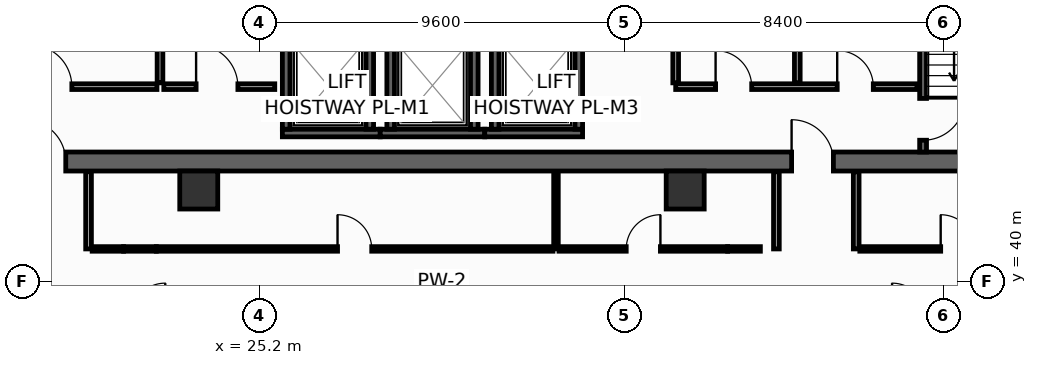
"""IFC4 building model, lengths in metres.
Left out: names, types, materials, properties, quantities, classifications, styles, units other than length and angle.
Written with IfcOpenShell. Run it as: python <this file> out.ifc"""

import sys

from ifc_helpers import new_model, si_unit, direction, frame, frame_2d, origin, origin_2d, place, context, subcontext, project, spatial, rectangle, hollow_rectangle, extrude, element, fill, save


model = new_model("IFC4")
c1 = context("Model", 3, precision=1e-05, world=origin(), true_north=direction((0.0, 1.0)))
c2 = subcontext(c1, "Body", "Model", "MODEL_VIEW")
j1 = project(units=[si_unit("LENGTHUNIT", "METRE"), si_unit("PLANEANGLEUNIT", "RADIAN")], contexts=[c1])
p1 = place(None, origin())
s1 = spatial("IfcSite", under=j1, at=p1, CompositionType="ELEMENT")
p2 = place(p1, origin())
s2 = spatial("IfcBuilding", under=s1, at=p2, CompositionType="ELEMENT")
p3 = place(p2, frame((0.0, 0.0, 163.8)))
s3 = spatial("IfcBuildingStorey", under=s2, at=p3, CompositionType="ELEMENT", Elevation=163.8)
p4 = place(p3, frame((13.6, 43.15, 0.0), z_axis=(0.0, 0.0, 1.0), x_axis=(1.0, 0.0, 0.0)))
e1 = element("IfcWall", 1, at=p4, inside=s3, PredefinedType="SHEAR", context=c2, shape_type="SweptSolid", body=[
    extrude(rectangle(XDim=32.7, YDim=0.5, at=frame_2d((16.35, 0.0))), origin(), (0.0, 0.0, 1.0), 3.55),
])
p5 = place(p4, frame((5.4, 0.0, 0.0)))
e2 = element("IfcOpeningElement", 2, at=p5, cuts=e1, PredefinedType="OPENING", context=c2, shape_type="SweptSolid", body=[
    extrude(rectangle(XDim=1.1, YDim=2.15, at=frame_2d((0.55, 1.075))), frame((0.0, 0.26, 0.0), z_axis=(0.0, -1.0, 0.0), x_axis=(1.0, 0.0, 0.0)), (0.0, 0.0, 1.0), 0.52),
])
p6 = place(p4, frame((25.6, 0.0, 0.0)))
e3 = element("IfcOpeningElement", 3, at=p6, cuts=e1, PredefinedType="OPENING", context=c2, shape_type="SweptSolid", body=[
    extrude(rectangle(XDim=1.1, YDim=2.15, at=frame_2d((0.55, 1.075))), frame((0.0, 0.26, 0.0), z_axis=(0.0, -1.0, 0.0), x_axis=(1.0, 0.0, 0.0)), (0.0, 0.0, 1.0), 0.52),
])
for number, where, z_axis, x_axis in (
    (4, (23.6, 42.4, 0.0), (0.0, 0.0, 1.0), (1.0, 0.0, 0.0)),
    (5, (36.4, 42.4, 0.0), (0.0, 0.0, 1.0), (1.0, 0.0, 0.0)),
):
    element("IfcColumn", number, at=place(p3, frame(where, z_axis=z_axis, x_axis=x_axis)), inside=s3, PredefinedType="COLUMN", context=c2, shape_type="SweptSolid", body=[
        extrude(hollow_rectangle(XDim=1.0, YDim=1.0, WallThickness=0.045, at=origin_2d()), origin(), (0.0, 0.0, 1.0), 3.8),
    ])
p7 = place(p3, frame((25.8, 43.9, 0.0), z_axis=(0.0, 0.0, 1.0), x_axis=(1.0, 0.0, 0.0)))
e6 = element("IfcWall", 6, at=p7, inside=s3, PredefinedType="SHEAR", context=c2, shape_type="SweptSolid", body=[
    extrude(rectangle(XDim=2.575, YDim=0.2, at=frame_2d((1.288, 0.0))), origin(), (0.0, 0.0, 1.0), 3.55),
])
for number, where, z_axis, x_axis in (
    (7, (25.9, 44.0, 0.0), (0.0, 0.0, 1.0), (0.0, 1.0, 0.0)),
    (8, (28.1, 44.0, 0.0), (0.0, 0.0, 1.0), (0.0, 1.0, 0.0)),
):
    element("IfcWall", number, at=place(p3, frame(where, z_axis=z_axis, x_axis=x_axis)), inside=s3, PredefinedType="SHEAR", context=c2, shape_type="SweptSolid", body=[
        extrude(rectangle(XDim=2.3, YDim=0.2, at=frame_2d((1.15, 0.0))), origin(), (0.0, 0.0, 1.0), 3.55),
    ])
p8 = place(p3, frame((28.375, 43.9, 0.0), z_axis=(0.0, 0.0, 1.0), x_axis=(1.0, 0.0, 0.0)))
e9 = element("IfcWall", 9, at=p8, inside=s3, PredefinedType="SHEAR", context=c2, shape_type="SweptSolid", body=[
    extrude(rectangle(XDim=2.75, YDim=0.2, at=frame_2d((1.375, 0.0))), origin(), (0.0, 0.0, 1.0), 3.55),
])
for number, where, z_axis, x_axis in (
    (10, (28.65, 44.0, 0.0), (0.0, 0.0, 1.0), (0.0, 1.0, 0.0)),
    (11, (30.85, 44.0, 0.0), (0.0, 0.0, 1.0), (0.0, 1.0, 0.0)),
):
    element("IfcWall", number, at=place(p3, frame(where, z_axis=z_axis, x_axis=x_axis)), inside=s3, PredefinedType="SHEAR", context=c2, shape_type="SweptSolid", body=[
        extrude(rectangle(XDim=2.3, YDim=0.2, at=frame_2d((1.15, 0.0))), origin(), (0.0, 0.0, 1.0), 3.55),
    ])
p9 = place(p3, frame((31.125, 43.9, 0.0), z_axis=(0.0, 0.0, 1.0), x_axis=(1.0, 0.0, 0.0)))
e12 = element("IfcWall", 12, at=p9, inside=s3, PredefinedType="SHEAR", context=c2, shape_type="SweptSolid", body=[
    extrude(rectangle(XDim=2.575, YDim=0.2, at=frame_2d((1.288, 0.0))), origin(), (0.0, 0.0, 1.0), 3.55),
])
for number, where, z_axis, x_axis in (
    (13, (31.4, 44.0, 0.0), (0.0, 0.0, 1.0), (0.0, 1.0, 0.0)),
    (14, (33.6, 44.0, 0.0), (0.0, 0.0, 1.0), (0.0, 1.0, 0.0)),
):
    element("IfcWall", number, at=place(p3, frame(where, z_axis=z_axis, x_axis=x_axis)), inside=s3, PredefinedType="SHEAR", context=c2, shape_type="SweptSolid", body=[
        extrude(rectangle(XDim=2.3, YDim=0.2, at=frame_2d((1.15, 0.0))), origin(), (0.0, 0.0, 1.0), 3.55),
    ])
p10 = place(p3, frame((42.66, 53.8, 0.0), z_axis=(0.0, 0.0, 1.0), x_axis=(0.0, -1.0, 0.0)))
e15 = element("IfcWall", 15, at=p10, inside=s3, PredefinedType="SHEAR", context=c2, shape_type="SweptSolid", body=[
    extrude(rectangle(XDim=10.4, YDim=0.18, at=frame_2d((5.2, 0.0))), origin(), (0.0, 0.0, 1.0), 3.55),
])
p11 = place(p10, frame((8.99, 0.0, 0.0)))
e16 = element("IfcOpeningElement", 16, at=p11, cuts=e15, PredefinedType="OPENING", context=c2, shape_type="SweptSolid", body=[
    extrude(rectangle(XDim=1.1, YDim=2.15, at=frame_2d((0.55, 1.075))), frame((0.0, 0.1, 0.0), z_axis=(0.0, -1.0, 0.0), x_axis=(1.0, 0.0, 0.0)), (0.0, 0.0, 1.0), 0.2),
])
p12 = place(p3, frame((17.36, 45.12, 0.0), z_axis=(0.0, 0.0, 1.0), x_axis=(1.0, 0.0, 0.0)))
e17 = element("IfcWall", 17, at=p12, inside=s3, PredefinedType="PARTITIONING", context=c2, shape_type="SweptSolid", body=[
    extrude(rectangle(XDim=5.14, YDim=0.15, at=frame_2d((2.57, 0.0))), origin(), (0.0, 0.0, 1.0), 3.55),
])
p13 = place(p12, frame((1.8, 0.0, 0.0)))
e18 = element("IfcOpeningElement", 18, at=p13, cuts=e17, PredefinedType="OPENING", context=c2, shape_type="SweptSolid", body=[
    extrude(rectangle(XDim=1.1, YDim=2.15, at=frame_2d((0.55, 1.075))), frame((0.0, 0.085, 0.0), z_axis=(0.0, -1.0, 0.0), x_axis=(1.0, 0.0, 0.0)), (0.0, 0.0, 1.0), 0.17),
])
p14 = place(p3, frame((22.58, 50.55, 0.0), z_axis=(0.0, 0.0, 1.0), x_axis=(0.0, -1.0, 0.0)))
e19 = element("IfcWall", 19, at=p14, inside=s3, PredefinedType="PARTITIONING", context=c2, shape_type="SweptSolid", body=[
    extrude(rectangle(XDim=5.33, YDim=0.15, at=frame_2d((2.665, 0.0))), origin(), (0.0, 0.0, 1.0), 3.55),
])
p15 = place(p14, frame((1.8, 0.0, 0.0)))
e20 = element("IfcOpeningElement", 20, at=p15, cuts=e19, PredefinedType="OPENING", context=c2, shape_type="SweptSolid", body=[
    extrude(rectangle(XDim=1.1, YDim=2.15, at=frame_2d((0.55, 1.075))), frame((0.0, 0.085, 0.0), z_axis=(0.0, -1.0, 0.0), x_axis=(1.0, 0.0, 0.0)), (0.0, 0.0, 1.0), 0.17),
])
p16 = place(p3, frame((22.68, 45.12, 0.0), z_axis=(0.0, 0.0, 1.0), x_axis=(1.0, 0.0, 0.0)))
e21 = element("IfcWall", 21, at=p16, inside=s3, PredefinedType="PARTITIONING", context=c2, shape_type="SweptSolid", body=[
    extrude(rectangle(XDim=2.92, YDim=0.15, at=frame_2d((1.46, 0.0))), origin(), (0.0, 0.0, 1.0), 3.55),
])
p17 = place(p16, frame((0.85, 0.0, 0.0)))
e22 = element("IfcOpeningElement", 22, at=p17, cuts=e21, PredefinedType="OPENING", context=c2, shape_type="SweptSolid", body=[
    extrude(rectangle(XDim=1.1, YDim=2.15, at=frame_2d((0.55, 1.075))), frame((0.0, 0.085, 0.0), z_axis=(0.0, -1.0, 0.0), x_axis=(1.0, 0.0, 0.0)), (0.0, 0.0, 1.0), 0.17),
])
p18 = place(p3, frame((36.15, 45.12, 0.0), z_axis=(0.0, 0.0, 1.0), x_axis=(1.0, 0.0, 0.0)))
e23 = element("IfcWall", 23, at=p18, inside=s3, PredefinedType="PARTITIONING", context=c2, shape_type="SweptSolid", body=[
    extrude(rectangle(XDim=6.35, YDim=0.15, at=frame_2d((3.175, 0.0))), origin(), (0.0, 0.0, 1.0), 3.55),
])
p19 = place(p18, frame((1.05, 0.0, 0.0)))
e24 = element("IfcOpeningElement", 24, at=p19, cuts=e23, PredefinedType="OPENING", context=c2, shape_type="SweptSolid", body=[
    extrude(rectangle(XDim=0.95, YDim=2.15, at=frame_2d((0.475, 1.075))), frame((0.0, 0.085, 0.0), z_axis=(0.0, -1.0, 0.0), x_axis=(1.0, 0.0, 0.0)), (0.0, 0.0, 1.0), 0.17),
])
p20 = place(p18, frame((4.25, 0.0, 0.0)))
e25 = element("IfcOpeningElement", 25, at=p20, cuts=e23, PredefinedType="OPENING", context=c2, shape_type="SweptSolid", body=[
    extrude(rectangle(XDim=0.95, YDim=2.15, at=frame_2d((0.475, 1.075))), frame((0.0, 0.085, 0.0), z_axis=(0.0, -1.0, 0.0), x_axis=(1.0, 0.0, 0.0)), (0.0, 0.0, 1.0), 0.17),
])
for number, where, z_axis, x_axis in (
    (26, (36.15, 45.22, 0.0), (0.0, 0.0, 1.0), (0.0, 1.0, 0.0)),
    (27, (39.35, 45.22, 0.0), (0.0, 0.0, 1.0), (0.0, 1.0, 0.0)),
):
    element("IfcWall", number, at=place(p3, frame(where, z_axis=z_axis, x_axis=x_axis)), inside=s3, PredefinedType="PARTITIONING", context=c2, shape_type="SweptSolid", body=[
        extrude(rectangle(XDim=2.63, YDim=0.15, at=frame_2d((1.315, 0.0))), origin(), (0.0, 0.0, 1.0), 3.55),
    ])
for number, where, z_axis, x_axis in (
    (28, (20.7, 40.85, 0.0), (0.0, 0.0, 1.0), (0.0, 1.0, 0.0)),
    (29, (38.8, 40.85, 0.0), (0.0, 0.0, 1.0), (0.0, 1.0, 0.0)),
    (30, (40.9, 40.85, 0.0), (0.0, 0.0, 1.0), (0.0, 1.0, 0.0)),
):
    element("IfcWall", number, at=place(p3, frame(where, z_axis=z_axis, x_axis=x_axis)), inside=s3, PredefinedType="PARTITIONING", context=c2, shape_type="SweptSolid", body=[
        extrude(rectangle(XDim=2.03, YDim=0.15, at=frame_2d((1.015, 0.0))), origin(), (0.0, 0.0, 1.0), 3.55),
    ])
p21 = place(p3, frame((33.0, 40.85, 0.0), z_axis=(0.0, 0.0, 1.0), x_axis=(0.0, 1.0, 0.0)))
e31 = element("IfcWall", 31, at=p21, inside=s3, PredefinedType="PARTITIONING", context=c2, shape_type="SweptSolid", body=[
    extrude(rectangle(XDim=2.03, YDim=0.12, at=frame_2d((1.015, 0.0))), origin(), (0.0, 0.0, 1.0), 2.835),
])
p22 = place(p3, frame((22.484, 40.85, 0.0), z_axis=(0.0, 0.0, 1.0), x_axis=(1.0, 0.0, 0.0)))
e32 = element("IfcWall", 32, at=p22, inside=s3, PredefinedType="PARTITIONING", context=c2, shape_type="SweptSolid", body=[
    extrude(rectangle(XDim=10.436, YDim=0.12, at=frame_2d((5.218, 0.0))), origin(), (0.0, 0.0, 1.0), 3.55),
])
p23 = place(p22, frame((4.768, 0.0, 0.0)))
e33 = element("IfcOpeningElement", 33, at=p23, cuts=e32, PredefinedType="OPENING", context=c2, shape_type="SweptSolid", body=[
    extrude(rectangle(XDim=0.9, YDim=2.1, at=frame_2d((0.45, 1.05))), frame((0.0, 0.07, 0.0), z_axis=(0.0, -1.0, 0.0), x_axis=(1.0, 0.0, 0.0)), (0.0, 0.0, 1.0), 0.14),
])
p24 = place(p3, frame((20.795, 40.85, 0.0), z_axis=(0.0, 0.0, 1.0), x_axis=(1.0, 0.0, 0.0)))
e34 = element("IfcWall", 34, at=p24, inside=s3, PredefinedType="PARTITIONING", context=c2, shape_type="SweptSolid", body=[
    extrude(rectangle(XDim=0.827, YDim=0.12, at=frame_2d((0.413, 0.0))), origin(), (0.0, 0.0, 1.0), 3.55),
])
p25 = place(p3, frame((21.622, 40.85, 0.0), z_axis=(0.0, 0.0, 1.0), x_axis=(1.0, 0.0, 0.0)))
e35 = element("IfcWall", 35, at=p25, inside=s3, PredefinedType="PARTITIONING", context=c2, shape_type="SweptSolid", body=[
    extrude(rectangle(XDim=0.862, YDim=0.12, at=frame_2d((0.431, 0.0))), origin(), (0.0, 0.0, 1.0), 2.135),
])
p26 = place(p3, frame((33.08, 40.85, 0.0), z_axis=(0.0, 0.0, 1.0), x_axis=(1.0, 0.0, 0.0)))
e36 = element("IfcWall", 36, at=p26, inside=s3, PredefinedType="PARTITIONING", context=c2, shape_type="SweptSolid", body=[
    extrude(rectangle(XDim=4.436, YDim=0.12, at=frame_2d((2.218, 0.0))), origin(), (0.0, 0.0, 1.0), 3.55),
])
p27 = place(p26, frame((1.768, 0.0, 0.0)))
e37 = element("IfcOpeningElement", 37, at=p27, cuts=e36, PredefinedType="OPENING", context=c2, shape_type="SweptSolid", body=[
    extrude(rectangle(XDim=0.9, YDim=2.1, at=frame_2d((0.45, 1.05))), frame((0.0, 0.07, 0.0), z_axis=(0.0, -1.0, 0.0), x_axis=(1.0, 0.0, 0.0)), (0.0, 0.0, 1.0), 0.14),
])
p28 = place(p3, frame((37.516, 40.85, 0.0), z_axis=(0.0, 0.0, 1.0), x_axis=(1.0, 0.0, 0.0)))
e38 = element("IfcWall", 38, at=p28, inside=s3, PredefinedType="PARTITIONING", context=c2, shape_type="SweptSolid", body=[
    extrude(rectangle(XDim=0.862, YDim=0.12, at=frame_2d((0.431, 0.0))), origin(), (0.0, 0.0, 1.0), 2.135),
])
p29 = place(p3, frame((40.995, 40.85, 0.0), z_axis=(0.0, 0.0, 1.0), x_axis=(1.0, 0.0, 0.0)))
e39 = element("IfcWall", 39, at=p29, inside=s3, PredefinedType="PARTITIONING", context=c2, shape_type="SweptSolid", body=[
    extrude(rectangle(XDim=5.155, YDim=0.12, at=frame_2d((2.577, 0.0))), origin(), (0.0, 0.0, 1.0), 3.55),
])
p30 = place(p29, frame((2.128, 0.0, 0.0)))
e40 = element("IfcOpeningElement", 40, at=p30, cuts=e39, PredefinedType="OPENING", context=c2, shape_type="SweptSolid", body=[
    extrude(rectangle(XDim=0.9, YDim=2.1, at=frame_2d((0.45, 1.05))), frame((0.0, 0.07, 0.0), z_axis=(0.0, -1.0, 0.0), x_axis=(1.0, 0.0, 0.0)), (0.0, 0.0, 1.0), 0.14),
])
p31 = place(p11, origin())
e41 = element("IfcDoor", 41, at=p31, inside=s3, OperationType="SINGLE_SWING_LEFT", PredefinedType="DOOR", context=c2, shape_type="SweptSolid", body=[
    extrude(rectangle(XDim=1.1, YDim=2.15, at=frame_2d((0.55, 1.075))), frame((0.0, 0.025, 0.0), z_axis=(0.0, -1.0, 0.0), x_axis=(1.0, 0.0, 0.0)), (0.0, 0.0, 1.0), 0.05),
])
fill(e16, e41)
p32 = place(p13, origin())
e42 = element("IfcDoor", 42, at=p32, inside=s3, OperationType="SINGLE_SWING_LEFT", PredefinedType="DOOR", context=c2, shape_type="SweptSolid", body=[
    extrude(rectangle(XDim=1.1, YDim=2.15, at=frame_2d((0.55, 1.075))), frame((0.0, 0.025, 0.0), z_axis=(0.0, -1.0, 0.0), x_axis=(1.0, 0.0, 0.0)), (0.0, 0.0, 1.0), 0.05),
])
fill(e18, e42)
p33 = place(p17, origin())
e43 = element("IfcDoor", 43, at=p33, inside=s3, OperationType="SINGLE_SWING_LEFT", PredefinedType="DOOR", context=c2, shape_type="SweptSolid", body=[
    extrude(rectangle(XDim=1.1, YDim=2.15, at=frame_2d((0.55, 1.075))), frame((0.0, 0.025, 0.0), z_axis=(0.0, -1.0, 0.0), x_axis=(1.0, 0.0, 0.0)), (0.0, 0.0, 1.0), 0.05),
])
fill(e22, e43)
p34 = place(p5, origin())
e44 = element("IfcDoor", 44, at=p34, inside=s3, OperationType="SINGLE_SWING_LEFT", PredefinedType="DOOR", context=c2, shape_type="SweptSolid", body=[
    extrude(rectangle(XDim=1.1, YDim=2.15, at=frame_2d((0.55, 1.075))), frame((0.0, 0.025, 0.0), z_axis=(0.0, -1.0, 0.0), x_axis=(1.0, 0.0, 0.0)), (0.0, 0.0, 1.0), 0.05),
])
fill(e2, e44)
p35 = place(p6, origin())
e45 = element("IfcDoor", 45, at=p35, inside=s3, OperationType="SINGLE_SWING_LEFT", PredefinedType="DOOR", context=c2, shape_type="SweptSolid", body=[
    extrude(rectangle(XDim=1.1, YDim=2.15, at=frame_2d((0.55, 1.075))), frame((0.0, 0.025, 0.0), z_axis=(0.0, -1.0, 0.0), x_axis=(1.0, 0.0, 0.0)), (0.0, 0.0, 1.0), 0.05),
])
fill(e3, e45)
p36 = place(p19, origin())
e46 = element("IfcDoor", 46, at=p36, inside=s3, OperationType="SINGLE_SWING_LEFT", PredefinedType="DOOR", context=c2, shape_type="SweptSolid", body=[
    extrude(rectangle(XDim=0.95, YDim=2.15, at=frame_2d((0.475, 1.075))), frame((0.0, 0.025, 0.0), z_axis=(0.0, -1.0, 0.0), x_axis=(1.0, 0.0, 0.0)), (0.0, 0.0, 1.0), 0.05),
])
fill(e24, e46)
p37 = place(p20, origin())
e47 = element("IfcDoor", 47, at=p37, inside=s3, OperationType="SINGLE_SWING_LEFT", PredefinedType="DOOR", context=c2, shape_type="SweptSolid", body=[
    extrude(rectangle(XDim=0.95, YDim=2.15, at=frame_2d((0.475, 1.075))), frame((0.0, 0.025, 0.0), z_axis=(0.0, -1.0, 0.0), x_axis=(1.0, 0.0, 0.0)), (0.0, 0.0, 1.0), 0.05),
])
fill(e25, e47)
p38 = place(p23, origin())
e48 = element("IfcDoor", 48, at=p38, inside=s3, OperationType="SINGLE_SWING_LEFT", PredefinedType="DOOR", context=c2, shape_type="SweptSolid", body=[
    extrude(rectangle(XDim=0.9, YDim=2.1, at=frame_2d((0.45, 1.05))), frame((0.0, 0.025, 0.0), z_axis=(0.0, -1.0, 0.0), x_axis=(1.0, 0.0, 0.0)), (0.0, 0.0, 1.0), 0.05),
])
fill(e33, e48)
p39 = place(p27, origin())
e49 = element("IfcDoor", 49, at=p39, inside=s3, OperationType="SINGLE_SWING_RIGHT", PredefinedType="DOOR", context=c2, shape_type="SweptSolid", body=[
    extrude(rectangle(XDim=0.9, YDim=2.1, at=frame_2d((0.45, 1.05))), frame((0.0, 0.025, 0.0), z_axis=(0.0, -1.0, 0.0), x_axis=(1.0, 0.0, 0.0)), (0.0, 0.0, 1.0), 0.05),
])
fill(e37, e49)
p40 = place(p30, origin())
e50 = element("IfcDoor", 50, at=p40, inside=s3, OperationType="SINGLE_SWING_LEFT", PredefinedType="DOOR", context=c2, shape_type="SweptSolid", body=[
    extrude(rectangle(XDim=0.9, YDim=2.1, at=frame_2d((0.45, 1.05))), frame((0.0, 0.025, 0.0), z_axis=(0.0, -1.0, 0.0), x_axis=(1.0, 0.0, 0.0)), (0.0, 0.0, 1.0), 0.05),
])
fill(e40, e50)
save(model, sys.argv[1])
